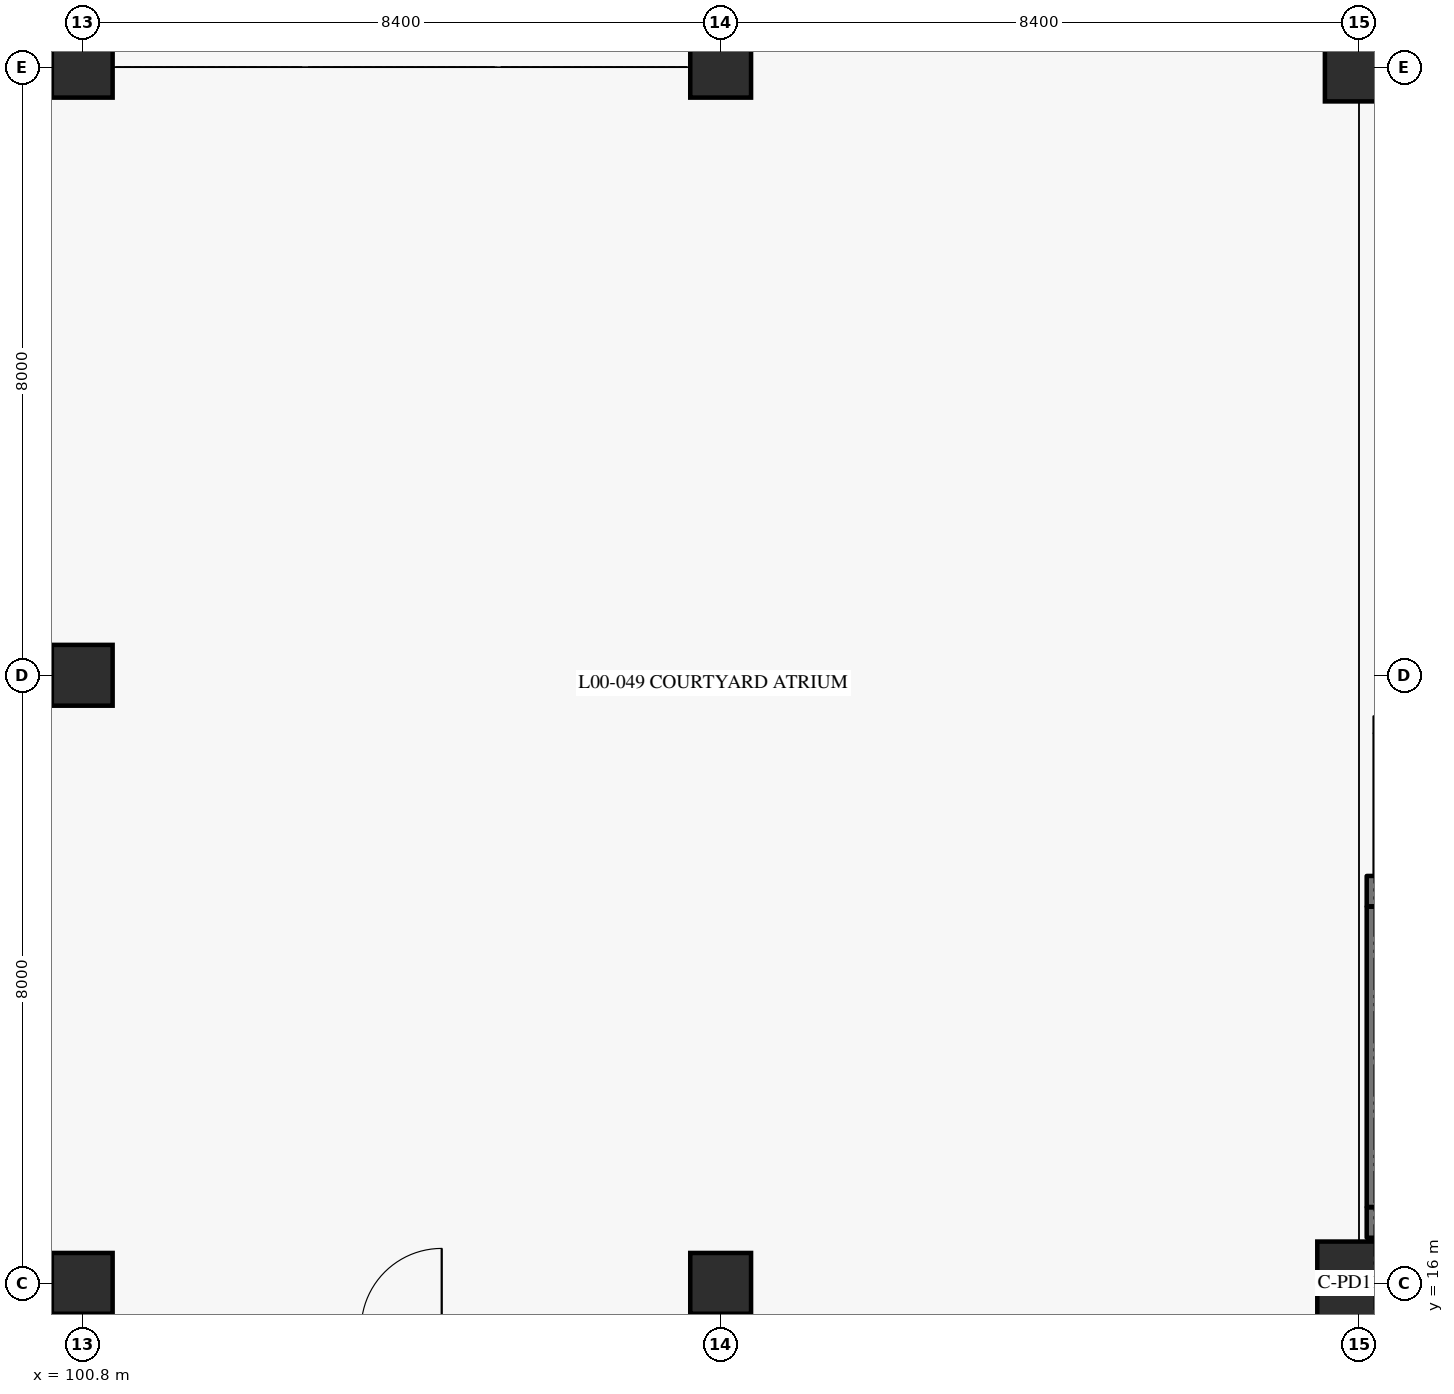
"""IFC4 building model, lengths in metres.
Left out: names, types, materials, properties, quantities, classifications, styles, units other than length and angle.
Written with IfcOpenShell. Run it as: python <this file> out.ifc"""

import sys

from ifc_helpers import new_model, si_unit, direction, frame, frame_2d, origin, origin_2d, place, context, subcontext, project, spatial, rectangle, circle, extrude, element, save


model = new_model("IFC4")
c1 = context("Model", 3, precision=1e-05, world=origin(), true_north=direction((0.0, 1.0)))
c2 = subcontext(c1, "Body", "Model", "MODEL_VIEW")
j1 = project(units=[si_unit("LENGTHUNIT", "METRE"), si_unit("PLANEANGLEUNIT", "RADIAN")], contexts=[c1])
p1 = place(None, origin())
s1 = spatial("IfcSite", under=j1, at=p1, CompositionType="ELEMENT")
p2 = place(p1, origin())
s2 = spatial("IfcBuilding", under=s1, at=p2, CompositionType="ELEMENT")
p3 = place(p2, origin())
s3 = spatial("IfcBuildingStorey", under=s2, at=p3, CompositionType="ELEMENT", Elevation=0.0)
for number, where, z_axis, x_axis in (
    (1, (100.8, 16.0, 0.0), (0.0, 0.0, 1.0), (1.0, 0.0, 0.0)),
    (2, (100.8, 24.0, 0.0), (0.0, 0.0, 1.0), (1.0, 0.0, 0.0)),
    (3, (100.8, 32.0, 0.0), (0.0, 0.0, 1.0), (1.0, 0.0, 0.0)),
    (4, (109.2, 16.0, 0.0), (0.0, 0.0, 1.0), (1.0, 0.0, 0.0)),
    (5, (109.2, 32.0, 0.0), (0.0, 0.0, 1.0), (1.0, 0.0, 0.0)),
):
    element("IfcColumn", number, at=place(p3, frame(where, z_axis=z_axis, x_axis=x_axis)), inside=s3, PredefinedType="COLUMN", context=c2, shape_type="SweptSolid", body=[
        extrude(rectangle(XDim=0.8, YDim=0.8, at=origin_2d()), origin(), (0.0, 0.0, 1.0), 6.0),
    ])
p4 = place(p3, frame((117.6, 16.0, 0.0), z_axis=(0.0, 0.0, 1.0), x_axis=(1.0, 0.0, 0.0)))
e6 = element("IfcColumn", 6, at=p4, inside=s3, PredefinedType="COLUMN", context=c2, shape_type="SweptSolid", body=[
    extrude(circle(Radius=0.55, at=origin_2d()), origin(), (0.0, 0.0, 1.0), 6.0),
])
p5 = place(p3, frame((117.6, 32.0, 0.0), z_axis=(0.0, 0.0, 1.0), x_axis=(1.0, 0.0, 0.0)))
e7 = element("IfcColumn", 7, at=p5, inside=s3, PredefinedType="COLUMN", context=c2, shape_type="SweptSolid", body=[
    extrude(circle(Radius=0.45, at=origin_2d()), origin(), (0.0, 0.0, 1.0), 6.0),
])
p6 = place(p3, frame((117.7, 16.8, 0.0), z_axis=(0.0, 0.0, 1.0), x_axis=(1.0, 0.0, 0.0)))
e8 = element("IfcWall", 8, at=p6, inside=s3, PredefinedType="SHEAR", context=c2, shape_type="SweptSolid", body=[
    extrude(rectangle(XDim=8.2, YDim=0.4, at=frame_2d((4.1, 0.0))), origin(), (0.0, 0.0, 1.0), 5.675),
])
p7 = place(p3, frame((117.7, 21.16, 0.0), z_axis=(0.0, 0.0, 1.0), x_axis=(1.0, 0.0, 0.0)))
e9 = element("IfcWall", 9, at=p7, inside=s3, PredefinedType="SHEAR", context=c2, shape_type="SweptSolid", body=[
    extrude(rectangle(XDim=8.2, YDim=0.4, at=frame_2d((4.1, 0.0))), origin(), (0.0, 0.0, 1.0), 5.675),
])
p8 = place(p7, frame((0.43, 0.0, 0.0)))
e10 = element("IfcOpeningElement", 10, at=p8, cuts=e9, PredefinedType="OPENING", context=c2, shape_type="SweptSolid", body=[
    extrude(rectangle(XDim=1.16, YDim=2.2, at=frame_2d((0.58, 1.1))), frame((0.0, 0.21, 0.0), z_axis=(0.0, -1.0, 0.0), x_axis=(1.0, 0.0, 0.0)), (0.0, 0.0, 1.0), 0.42),
])
p9 = place(p3, frame((117.9, 17.005, 0.0), z_axis=(0.0, 0.0, 1.0), x_axis=(0.0, 1.0, 0.0)))
e11 = element("IfcWall", 11, at=p9, inside=s3, PredefinedType="SHEAR", context=c2, shape_type="SweptSolid", body=[
    extrude(rectangle(XDim=3.95, YDim=0.4, at=frame_2d((1.975, 0.0))), origin(), (0.0, 0.0, 1.0), 5.675),
])
p10 = place(p3, frame((117.9, 21.365, 0.0), z_axis=(0.0, 0.0, 1.0), x_axis=(0.0, 1.0, 0.0)))
e12 = element("IfcWall", 12, at=p10, inside=s3, PredefinedType="PARTITIONING", context=c2, shape_type="SweptSolid", body=[
    extrude(rectangle(XDim=1.87, YDim=0.22, at=frame_2d((0.935, 0.0))), origin(), (0.0, 0.0, 1.0), 4.75),
])
p11 = place(p3, frame((117.79, 23.35, 0.0), z_axis=(0.0, 0.0, 1.0), x_axis=(1.0, 0.0, 0.0)))
e13 = element("IfcWall", 13, at=p11, inside=s3, PredefinedType="PARTITIONING", context=c2, shape_type="SweptSolid", body=[
    extrude(rectangle(XDim=4.22, YDim=0.22, at=frame_2d((2.11, 0.0))), origin(), (0.0, 0.0, 1.0), 5.675),
])
p12 = place(p11, frame((1.55, 0.0, 0.0)))
e14 = element("IfcOpeningElement", 14, at=p12, cuts=e13, PredefinedType="OPENING", context=c2, shape_type="SweptSolid", body=[
    extrude(rectangle(XDim=1.12, YDim=2.2, at=frame_2d((0.56, 1.1))), frame((0.0, 0.12, 0.0), z_axis=(0.0, -1.0, 0.0), x_axis=(1.0, 0.0, 0.0)), (0.0, 0.0, 1.0), 0.24),
])
save(model, sys.argv[1])
